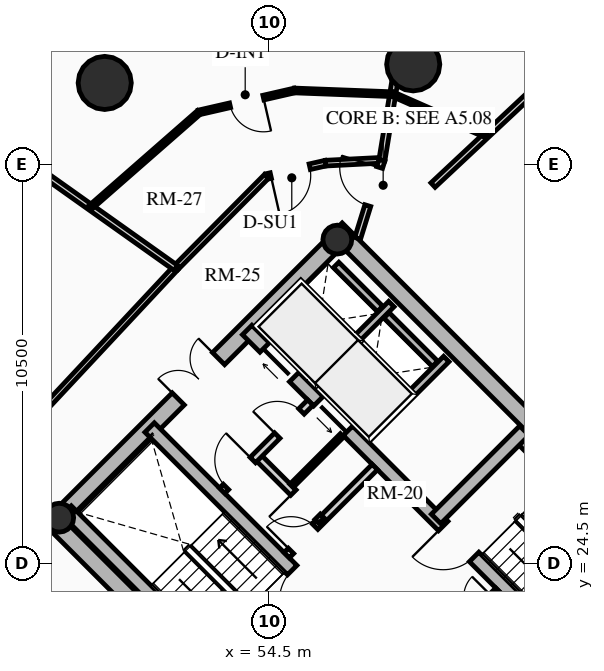
"""IFC4 building model, lengths in metres.
Left out: names, types, materials, properties, quantities, classifications, styles, units other than length and angle.
Written with IfcOpenShell. Run it as: python <this file> out.ifc"""

import sys

from ifc_helpers import new_model, si_unit, direction, frame, frame_2d, origin, origin_2d, place, context, subcontext, project, spatial, rectangle, circle, hollow_circle, extrude, source, transform, mapped, element, fill, save


model = new_model("IFC4")
c1 = context("Model", 3, precision=1e-05, world=origin(), true_north=direction((0.0, 1.0)))
c2 = subcontext(c1, "Body", "Model", "MODEL_VIEW")
j1 = project(units=[si_unit("LENGTHUNIT", "METRE"), si_unit("PLANEANGLEUNIT", "RADIAN")], contexts=[c1])
p1 = place(None, origin())
s1 = spatial("IfcSite", under=j1, at=p1, CompositionType="ELEMENT")
p2 = place(p1, origin())
s2 = spatial("IfcBuilding", under=s1, at=p2, CompositionType="ELEMENT")
p3 = place(p2, frame((0.0, 0.0, 110.89)))
s3 = spatial("IfcBuildingStorey", under=s2, at=p3, CompositionType="ELEMENT", Elevation=110.89)
for number, where, z_axis, x_axis in (
    (1, (58.737, 15.697, 0.0), (0.0, 0.0, 1.0), (-0.707, 0.707, 0.0)),
    (2, (66.303, 23.263, 0.0), (0.0, 0.0, 1.0), (-0.707, 0.707, 0.0)),
):
    element("IfcWall", number, at=place(p3, frame(where, z_axis=z_axis, x_axis=x_axis)), inside=s3, PredefinedType="SHEAR", context=c2, shape_type="SweptSolid", body=[
        extrude(rectangle(XDim=14.2, YDim=0.45, at=frame_2d((7.1, 0.0))), origin(), (0.0, 0.0, 1.0), 2.91),
    ])
p4 = place(p3, frame((48.856, 25.578, 0.0), z_axis=(0.0, 0.0, 1.0), x_axis=(0.707106781187, 0.707106781187, 0.0)))
e3 = element("IfcWall", 3, at=p4, inside=s3, PredefinedType="SHEAR", context=c2, shape_type="SweptSolid", body=[
    extrude(rectangle(XDim=10.7, YDim=0.45, at=frame_2d((5.35, 0.0))), origin(), (0.0, 0.0, 1.0), 2.91),
])
m1 = source(origin(), c2, "Body", "SweptSolid", [
    extrude(rectangle(XDim=1.5, YDim=2.02, at=frame_2d((0.75, 1.01))), frame((0.0, 0.235, 0.0), z_axis=(0.0, -1.0, 0.0), x_axis=(1.0, 0.0, 0.0)), (0.0, 0.0, 1.0), 0.47),
])
p5 = place(p4, frame((4.6, 0.0, 0.0)))
e4 = element("IfcOpeningElement", 4, at=p5, cuts=e3, PredefinedType="OPENING", context=c2, shape_type="MappedRepresentation", body=[
    mapped(m1, transform((0.0, 0.0, 0.0), x_axis=(1.0, 0.0, 0.0), y_axis=(0.0, 1.0, 0.0), z_axis=(0.0, 0.0, 1.0), scale=1.0)),
])
p6 = place(p3, frame((61.078, 18.355, 0.0), z_axis=(0.0, 0.0, 1.0), x_axis=(-0.707106781187, 0.707106781187, 0.0)))
e5 = element("IfcWall", 5, at=p6, inside=s3, PredefinedType="SHEAR", context=c2, shape_type="SweptSolid", body=[
    extrude(rectangle(XDim=13.75, YDim=0.35, at=frame_2d((6.875, 0.0))), origin(), (0.0, 0.0, 1.0), 2.91),
])
m2 = source(origin(), c2, "Body", "SweptSolid", [
    extrude(rectangle(XDim=1.1, YDim=2.015, at=frame_2d((0.55, 1.007))), frame((0.0, 0.185, 0.0), z_axis=(0.0, -1.0, 0.0), x_axis=(1.0, 0.0, 0.0)), (0.0, 0.0, 1.0), 0.37),
])
p7 = place(p6, frame((4.875, 0.0, 0.0)))
e6 = element("IfcOpeningElement", 6, at=p7, cuts=e5, PredefinedType="OPENING", context=c2, shape_type="MappedRepresentation", body=[
    mapped(m2, transform((0.0, 0.0, 0.0), x_axis=(1.0, 0.0, 0.0), y_axis=(0.0, 1.0, 0.0), z_axis=(0.0, 0.0, 1.0), scale=1.0)),
])
m3 = source(origin(), c2, "Body", "SweptSolid", [
    extrude(rectangle(XDim=1.15, YDim=2.02, at=frame_2d((0.575, 1.01))), frame((0.0, 0.185, 0.0), z_axis=(0.0, -1.0, 0.0), x_axis=(1.0, 0.0, 0.0)), (0.0, 0.0, 1.0), 0.37),
])
p8 = place(p6, frame((7.295, 0.0, 0.0)))
e7 = element("IfcOpeningElement", 7, at=p8, cuts=e5, PredefinedType="OPENING", context=c2, shape_type="MappedRepresentation", body=[
    mapped(m3, transform((0.0, 0.0, 0.0), x_axis=(1.0, 0.0, 0.0), y_axis=(0.0, 1.0, 0.0), z_axis=(0.0, 0.0, 1.0), scale=1.0)),
])
p9 = place(p3, frame((63.645, 20.922, 0.0), z_axis=(0.0, 0.0, 1.0), x_axis=(-0.707106781187, 0.707106781187, 0.0)))
e8 = element("IfcWall", 8, at=p9, inside=s3, PredefinedType="SHEAR", context=c2, shape_type="SweptSolid", body=[
    extrude(rectangle(XDim=13.75, YDim=0.35, at=frame_2d((6.875, 0.0))), origin(), (0.0, 0.0, 1.0), 2.91),
])
p10 = place(p9, frame((10.0, 0.0, 0.0)))
e9 = element("IfcOpeningElement", 9, at=p10, cuts=e8, PredefinedType="OPENING", context=c2, shape_type="MappedRepresentation", body=[
    mapped(m2, transform((0.0, 0.0, 0.0), x_axis=(1.0, 0.0, 0.0), y_axis=(0.0, 1.0, 0.0), z_axis=(0.0, 0.0, 1.0), scale=1.0)),
])
p11 = place(p9, frame((12.0, 0.0, 0.0)))
e10 = element("IfcOpeningElement", 10, at=p11, cuts=e8, PredefinedType="OPENING", context=c2, shape_type="MappedRepresentation", body=[
    mapped(m2, transform((0.0, 0.0, 0.0), x_axis=(1.0, 0.0, 0.0), y_axis=(0.0, 1.0, 0.0), z_axis=(0.0, 0.0, 1.0), scale=1.0)),
])
p12 = place(p9, frame((5.305, 0.0, 0.0)))
e11 = element("IfcOpeningElement", 11, at=p12, cuts=e8, PredefinedType="OPENING", context=c2, shape_type="MappedRepresentation", body=[
    mapped(m3, transform((0.0, 0.0, 0.0), x_axis=(1.0, 0.0, 0.0), y_axis=(0.0, 1.0, 0.0), z_axis=(0.0, 0.0, 1.0), scale=1.0)),
])
for number, where, z_axis, x_axis in (
    (12, (53.922, 21.141, 0.0), (0.0, 0.0, 1.0), (-0.707, 0.707, 0.0)),
    (13, (65.83, 23.107, 0.0), (0.0, 0.0, 1.0), (-0.707, 0.707, 0.0)),
):
    element("IfcWall", number, at=place(p3, frame(where, z_axis=z_axis, x_axis=x_axis)), inside=s3, PredefinedType="SHEAR", context=c2, shape_type="SweptSolid", body=[
        extrude(rectangle(XDim=6.72, YDim=0.35, at=frame_2d((3.36, 0.0))), origin(), (0.0, 0.0, 1.0), 2.91),
    ])
p13 = place(p3, frame((58.893, 25.674, 0.0), z_axis=(0.0, 0.0, 1.0), x_axis=(0.707106781187, 0.707106781187, 0.0)))
e14 = element("IfcWall", 14, at=p13, inside=s3, PredefinedType="SHEAR", context=c2, shape_type="SweptSolid", body=[
    extrude(rectangle(XDim=3.285, YDim=0.35, at=frame_2d((1.643, 0.0))), origin(), (0.0, 0.0, 1.0), 2.91),
])
for number, where, z_axis, x_axis in (
    (15, (48.976, 25.706, 0.0), (0.0, 0.0, 1.0), (0.707, 0.707, 0.0)),
    (16, (56.294, 33.024, 0.0), (0.0, 0.0, 1.0), (0.707, 0.707, 0.0)),
):
    element("IfcColumn", number, at=place(p3, frame(where, z_axis=z_axis, x_axis=x_axis)), inside=s3, PredefinedType="COLUMN", context=c2, shape_type="SweptSolid", body=[
        extrude(hollow_circle(Radius=0.38, WallThickness=0.032, at=origin_2d()), origin(), (0.0, 0.0, 1.0), 2.91),
    ])
for number, where, z_axis, x_axis in (
    (17, (58.291, 37.635, 0.0), (0.0, 0.0, 1.0), (1.0, 0.0, 0.0)),
    (18, (50.173, 37.146, 0.0), (0.0, 0.0, 1.0), (1.0, 0.0, 0.0)),
):
    element("IfcColumn", number, at=place(p3, frame(where, z_axis=z_axis, x_axis=x_axis)), inside=s3, PredefinedType="USERDEFINED", context=c2, shape_type="SweptSolid", body=[
        extrude(circle(Radius=0.7, at=origin_2d()), origin(), (0.0, 0.0, 1.0), 2.91),
    ])
p14 = place(p3, frame((57.062, 27.781, 0.0), z_axis=(0.0, 0.0, 1.0), x_axis=(0.707106781187, 0.707106781187, 0.0)))
e19 = element("IfcWall", 19, at=p14, inside=s3, PredefinedType="SHEAR", context=c2, shape_type="SweptSolid", body=[
    extrude(rectangle(XDim=2.97, YDim=0.2, at=frame_2d((1.485, 0.0))), origin(), (0.0, 0.0, 1.0), 2.91),
])
p15 = place(p3, frame((55.615, 29.227, 0.0), z_axis=(0.0, 0.0, 1.0), x_axis=(0.707147878904, 0.70706568108, 0.0)))
e20 = element("IfcWall", 20, at=p15, inside=s3, PredefinedType="SHEAR", context=c2, shape_type="SweptSolid", body=[
    extrude(rectangle(XDim=2.97, YDim=0.2, at=frame_2d((1.485, 0.0))), origin(), (0.0, 0.0, 1.0), 2.91),
])
p16 = place(p3, frame((58.865, 29.754, 0.0), z_axis=(0.0, 0.0, 1.0), x_axis=(-0.707174411312, 0.707039144592, 0.0)))
e21 = element("IfcWall", 21, at=p16, inside=s3, PredefinedType="SHEAR", context=c2, shape_type="SweptSolid", body=[
    extrude(rectangle(XDim=1.805, YDim=0.2, at=frame_2d((0.902, 0.0))), origin(), (0.0, 0.0, 1.0), 2.91),
])
p17 = place(p3, frame((57.419, 31.2, 0.0), z_axis=(0.0, 0.0, 1.0), x_axis=(-0.707032117043, 0.707181437447, 0.0)))
e22 = element("IfcWall", 22, at=p17, inside=s3, PredefinedType="SHEAR", context=c2, shape_type="SweptSolid", body=[
    extrude(rectangle(XDim=1.635, YDim=0.2, at=frame_2d((0.817, 0.0))), origin(), (0.0, 0.0, 1.0), 2.91),
])
p18 = place(p3, frame((58.214, 21.467, 0.0), z_axis=(0.0, 0.0, 1.0), x_axis=(0.707106781187, 0.707106781187, 0.0)))
e23 = element("IfcWall", 23, at=p18, inside=s3, PredefinedType="PARTITIONING", context=c2, shape_type="SweptSolid", body=[
    extrude(rectangle(XDim=3.28, YDim=0.2, at=frame_2d((1.64, 0.0))), origin(), (0.0, 0.0, 1.0), 2.655),
])
m4 = source(origin(), c2, "Body", "SweptSolid", [
    extrude(rectangle(XDim=1.5, YDim=2.02, at=frame_2d((0.75, 1.01))), frame((0.0, 0.11, 0.0), z_axis=(0.0, -1.0, 0.0), x_axis=(1.0, 0.0, 0.0)), (0.0, 0.0, 1.0), 0.22),
])
p19 = place(p18, frame((1.55, 0.0, 0.0)))
e24 = element("IfcOpeningElement", 24, at=p19, cuts=e23, PredefinedType="OPENING", context=c2, shape_type="MappedRepresentation", body=[
    mapped(m4, transform((0.0, 0.0, 0.0), x_axis=(1.0, 0.0, 0.0), y_axis=(0.0, 1.0, 0.0), z_axis=(0.0, 0.0, 1.0), scale=1.0)),
])
p20 = place(p3, frame((54.961, 24.719, 0.0), z_axis=(0.0, 0.0, 1.0), x_axis=(0.707106781187, 0.707106781187, 0.0)))
e25 = element("IfcWall", 25, at=p20, inside=s3, PredefinedType="PARTITIONING", context=c2, shape_type="SweptSolid", body=[
    extrude(rectangle(XDim=3.28, YDim=0.2, at=frame_2d((1.64, 0.0))), origin(), (0.0, 0.0, 1.0), 2.655),
])
m5 = source(origin(), c2, "Body", "SweptSolid", [
    extrude(rectangle(XDim=0.9, YDim=2.005, at=frame_2d((0.45, 1.002))), frame((0.0, 0.11, 0.0), z_axis=(0.0, -1.0, 0.0), x_axis=(1.0, 0.0, 0.0)), (0.0, 0.0, 1.0), 0.22),
])
p21 = place(p20, frame((0.16, 0.0, 0.0)))
e26 = element("IfcOpeningElement", 26, at=p21, cuts=e25, PredefinedType="OPENING", context=c2, shape_type="MappedRepresentation", body=[
    mapped(m5, transform((0.0, 0.0, 0.0), x_axis=(1.0, 0.0, 0.0), y_axis=(0.0, 1.0, 0.0), z_axis=(0.0, 0.0, 1.0), scale=1.0)),
])
p22 = place(p3, frame((55.874, 25.631, 0.0), z_axis=(0.0, 0.0, 1.0), x_axis=(-0.707157639372, 0.707055919343, 0.0)))
e27 = element("IfcWall", 27, at=p22, inside=s3, PredefinedType="PARTITIONING", context=c2, shape_type="SweptSolid", body=[
    extrude(rectangle(XDim=2.4, YDim=0.2, at=frame_2d((1.2, 0.0))), origin(), (0.0, 0.0, 1.0), 2.655),
])
p23 = place(p22, frame((0.14, 0.0, 0.0)))
e28 = element("IfcOpeningElement", 28, at=p23, cuts=e27, PredefinedType="OPENING", context=c2, shape_type="MappedRepresentation", body=[
    mapped(m5, transform((0.0, 0.0, 0.0), x_axis=(1.0, 0.0, 0.0), y_axis=(0.0, 1.0, 0.0), z_axis=(0.0, 0.0, 1.0), scale=1.0)),
])
p24 = place(p3, frame((53.264, 26.416, 0.0), z_axis=(0.0, 0.0, 1.0), x_axis=(0.707106781187, 0.707106781187, 0.0)))
e29 = element("IfcWall", 29, at=p24, inside=s3, PredefinedType="PARTITIONING", context=c2, shape_type="SweptSolid", body=[
    extrude(rectangle(XDim=3.28, YDim=0.2, at=frame_2d((1.64, 0.0))), origin(), (0.0, 0.0, 1.0), 2.655),
])
m6 = source(origin(), c2, "Body", "SweptSolid", [
    extrude(rectangle(XDim=1.0, YDim=2.015, at=frame_2d((0.5, 1.007))), frame((0.0, 0.11, 0.0), z_axis=(0.0, -1.0, 0.0), x_axis=(1.0, 0.0, 0.0)), (0.0, 0.0, 1.0), 0.22),
])
p25 = place(p24, frame((0.14, 0.0, 0.0)))
e30 = element("IfcOpeningElement", 30, at=p25, cuts=e29, PredefinedType="OPENING", context=c2, shape_type="MappedRepresentation", body=[
    mapped(m6, transform((0.0, 0.0, 0.0), x_axis=(1.0, 0.0, 0.0), y_axis=(0.0, 1.0, 0.0), z_axis=(0.0, 0.0, 1.0), scale=1.0)),
])
p26 = place(p24, frame((2.05, 0.0, 0.0)))
e31 = element("IfcOpeningElement", 31, at=p26, cuts=e29, PredefinedType="OPENING", context=c2, shape_type="MappedRepresentation", body=[
    mapped(m5, transform((0.0, 0.0, 0.0), x_axis=(1.0, 0.0, 0.0), y_axis=(0.0, 1.0, 0.0), z_axis=(0.0, 0.0, 1.0), scale=1.0)),
])
p27 = place(p3, frame((55.089, 26.543, 0.0), z_axis=(0.0, 0.0, 1.0), x_axis=(0.707106781187, 0.707106781187, 0.0)))
e32 = element("IfcWall", 32, at=p27, inside=s3, PredefinedType="PARTITIONING", context=c2, shape_type="SweptSolid", body=[
    extrude(rectangle(XDim=1.88, YDim=0.125, at=frame_2d((0.94, 0.0))), origin(), (0.0, 0.0, 1.0), 2.655),
])
p28 = place(p3, frame((57.467, 35.111, 0.0), z_axis=(0.0, 0.0, 1.0), x_axis=(-0.998691757323, -0.051134859488, 0.0)))
e33 = element("IfcWall", 33, at=p28, inside=s3, PredefinedType="PARTITIONING", context=c2, shape_type="SweptSolid", body=[
    extrude(rectangle(XDim=1.485, YDim=0.15, at=frame_2d((0.742, 0.0))), origin(), (0.0, 0.0, 1.0), 2.225),
])
p29 = place(p3, frame((55.984, 35.035, 0.0), z_axis=(0.0, 0.0, 1.0), x_axis=(-0.975290305708, -0.22092718165, 0.0)))
e34 = element("IfcWall", 34, at=p29, inside=s3, PredefinedType="PARTITIONING", context=c2, shape_type="SweptSolid", body=[
    extrude(rectangle(XDim=1.597, YDim=0.15, at=frame_2d((0.798, 0.0))), origin(), (0.0, 0.0, 1.0), 2.225),
])
m7 = source(origin(), c2, "Body", "SweptSolid", [
    extrude(rectangle(XDim=1.05, YDim=2.015, at=frame_2d((0.525, 1.007))), frame((0.0, 0.085, 0.0), z_axis=(0.0, -1.0, 0.0), x_axis=(1.0, 0.0, 0.0)), (0.0, 0.0, 1.0), 0.17),
])
p30 = place(p29, frame((0.427, 0.0, 0.0)))
e35 = element("IfcOpeningElement", 35, at=p30, cuts=e34, PredefinedType="OPENING", context=c2, shape_type="MappedRepresentation", body=[
    mapped(m7, transform((0.0, 0.0, 0.0), x_axis=(1.0, 0.0, 0.0), y_axis=(0.0, 1.0, 0.0), z_axis=(0.0, 0.0, 1.0), scale=1.0)),
])
p31 = place(p3, frame((54.427, 34.683, 0.0), z_axis=(0.0, 0.0, 1.0), x_axis=(-0.704178989986, -0.710022499687, 0.0)))
e36 = element("IfcWall", 36, at=p31, inside=s3, PredefinedType="PARTITIONING", context=c2, shape_type="SweptSolid", body=[
    extrude(rectangle(XDim=3.384, YDim=0.15, at=frame_2d((1.692, 0.0))), origin(), (0.0, 0.0, 1.0), 2.225),
])
p32 = place(p3, frame((52.043, 32.28, 0.0), z_axis=(0.0, 0.0, 1.0), x_axis=(-0.682606081633, -0.730786519661, 0.0)))
e37 = element("IfcWall", 37, at=p32, inside=s3, PredefinedType="PARTITIONING", context=c2, shape_type="SweptSolid", body=[
    extrude(rectangle(XDim=6.527, YDim=0.15, at=frame_2d((3.263, 0.0))), origin(), (0.0, 0.0, 1.0), 2.225),
])
p33 = place(p3, frame((58.812, 34.458, 0.0), z_axis=(0.0, 0.0, 1.0), x_axis=(0.73022196979, 0.683209978584, 0.0)))
e38 = element("IfcWall", 38, at=p33, inside=s3, PredefinedType="PARTITIONING", context=c2, shape_type="SweptSolid", body=[
    extrude(rectangle(XDim=6.834, YDim=0.16, at=frame_2d((3.417, 0.0))), origin(), (0.0, 0.0, 1.0), 2.179),
])
p34 = place(p3, frame((57.467, 35.111, 0.0), z_axis=(0.0, 0.0, 1.0), x_axis=(0.161711214096, 0.98683812413, 0.0)))
e39 = element("IfcWall", 39, at=p34, inside=s3, PredefinedType="PARTITIONING", context=c2, shape_type="SweptSolid", body=[
    extrude(rectangle(XDim=6.291, YDim=0.16, at=frame_2d((3.146, 0.0))), origin(), (0.0, 0.0, 1.0), 2.179),
])
p35 = place(p3, frame((52.043, 32.28, 0.0), z_axis=(0.0, 0.0, 1.0), x_axis=(-0.81534487613, 0.578975589268, 0.0)))
e40 = element("IfcWall", 40, at=p35, inside=s3, PredefinedType="PARTITIONING", context=c2, shape_type="SweptSolid", body=[
    extrude(rectangle(XDim=9.829, YDim=0.16, at=frame_2d((4.915, 0.0))), origin(), (0.0, 0.0, 1.0), 2.179),
])
p36 = place(p3, frame((56.828, 33.056, 0.0), z_axis=(0.0, 0.0, 1.0), x_axis=(0.296730996083, 0.954961107042, 0.0)))
e41 = element("IfcWall", 41, at=p36, inside=s3, PredefinedType="PARTITIONING", context=c2, shape_type="SweptSolid", body=[
    extrude(rectangle(XDim=2.152, YDim=0.16, at=frame_2d((1.076, 0.0))), origin(), (0.0, 0.0, 1.0), 2.225),
])
m8 = source(origin(), c2, "Body", "SweptSolid", [
    extrude(rectangle(XDim=1.05, YDim=2.015, at=frame_2d((0.525, 1.007))), frame((0.0, 0.09, 0.0), z_axis=(0.0, -1.0, 0.0), x_axis=(1.0, 0.0, 0.0)), (0.0, 0.0, 1.0), 0.18),
])
p37 = place(p36, frame((0.902, 0.0, 0.0)))
e42 = element("IfcOpeningElement", 42, at=p37, cuts=e41, PredefinedType="OPENING", context=c2, shape_type="MappedRepresentation", body=[
    mapped(m8, transform((0.0, 0.0, 0.0), x_axis=(1.0, 0.0, 0.0), y_axis=(0.0, 1.0, 0.0), z_axis=(0.0, 0.0, 1.0), scale=1.0)),
])
p38 = place(p3, frame((60.209, 35.766, 0.0), z_axis=(0.0, 0.0, 1.0), x_axis=(-0.914932611268, 0.403606636267, 0.0)))
e43 = element("IfcWall", 43, at=p38, inside=s3, PredefinedType="PARTITIONING", context=c2, shape_type="SweptSolid", body=[
    extrude(rectangle(XDim=2.686, YDim=0.125, at=frame_2d((1.343, 0.0))), origin(), (0.0, 0.0, 1.0), 2.225),
])
p39 = place(p3, frame((57.752, 36.85, 0.0), z_axis=(0.0, 0.0, 1.0), x_axis=(-0.999279468675, 0.037954492291, 0.0)))
e44 = element("IfcWall", 44, at=p39, inside=s3, PredefinedType="PARTITIONING", context=c2, shape_type="SweptSolid", body=[
    extrude(rectangle(XDim=2.586, YDim=0.125, at=frame_2d((1.293, 0.0))), origin(), (0.0, 0.0, 1.0), 2.655),
])
p40 = place(p3, frame((55.168, 36.948, 0.0), z_axis=(0.0, 0.0, 1.0), x_axis=(-0.974677367116, -0.223615808993, 0.0)))
e45 = element("IfcWall", 45, at=p40, inside=s3, PredefinedType="PARTITIONING", context=c2, shape_type="SweptSolid", body=[
    extrude(rectangle(XDim=2.581, YDim=0.125, at=frame_2d((1.291, 0.0))), origin(), (0.0, 0.0, 1.0), 2.225),
])
m9 = source(origin(), c2, "Body", "SweptSolid", [
    extrude(rectangle(XDim=0.9, YDim=2.005, at=frame_2d((0.45, 1.002))), frame((0.0, 0.073, 0.0), z_axis=(0.0, -1.0, 0.0), x_axis=(1.0, 0.0, 0.0)), (0.0, 0.0, 1.0), 0.145),
])
p41 = place(p40, frame((0.841, 0.0, 0.0)))
e46 = element("IfcOpeningElement", 46, at=p41, cuts=e45, PredefinedType="OPENING", context=c2, shape_type="MappedRepresentation", body=[
    mapped(m9, transform((0.0, 0.0, 0.0), x_axis=(1.0, 0.0, 0.0), y_axis=(0.0, 1.0, 0.0), z_axis=(0.0, 0.0, 1.0), scale=1.0)),
])
p42 = place(p3, frame((52.652, 36.371, 0.0), z_axis=(0.0, 0.0, 1.0), x_axis=(-0.752401146533, -0.658705180408, 0.0)))
e47 = element("IfcWall", 47, at=p42, inside=s3, PredefinedType="PARTITIONING", context=c2, shape_type="SweptSolid", body=[
    extrude(rectangle(XDim=3.791, YDim=0.125, at=frame_2d((1.896, 0.0))), origin(), (0.0, 0.0, 1.0), 2.225),
])
m10 = source(origin(), c2, "Body", "SweptSolid", [
    extrude(rectangle(XDim=1.1, YDim=2.015, at=frame_2d((0.55, 1.007))), frame((0.0, 0.025, 0.0), z_axis=(0.0, -1.0, 0.0), x_axis=(1.0, 0.0, 0.0)), (0.0, 0.0, 1.0), 0.05),
])
p43 = place(p10, origin())
e48 = element("IfcDoor", 48, at=p43, inside=s3, OperationType="SLIDING_TO_LEFT", PredefinedType="DOOR", context=c2, shape_type="MappedRepresentation", body=[
    mapped(m10, transform((0.0, 0.0, 0.0), x_axis=(1.0, 0.0, 0.0), y_axis=(0.0, 1.0, 0.0), z_axis=(0.0, 0.0, 1.0), scale=1.0)),
])
fill(e9, e48)
p44 = place(p11, origin())
e49 = element("IfcDoor", 49, at=p44, inside=s3, OperationType="SLIDING_TO_RIGHT", PredefinedType="DOOR", context=c2, shape_type="MappedRepresentation", body=[
    mapped(m10, transform((0.0, 0.0, 0.0), x_axis=(1.0, 0.0, 0.0), y_axis=(0.0, 1.0, 0.0), z_axis=(0.0, 0.0, 1.0), scale=1.0)),
])
fill(e10, e49)
m11 = source(origin(), c2, "Body", "SweptSolid", [
    extrude(rectangle(XDim=1.15, YDim=2.02, at=frame_2d((0.575, 1.01))), frame((0.0, 0.025, 0.0), z_axis=(0.0, -1.0, 0.0), x_axis=(1.0, 0.0, 0.0)), (0.0, 0.0, 1.0), 0.05),
])
p45 = place(p8, origin())
e50 = element("IfcDoor", 50, at=p45, inside=s3, OperationType="SINGLE_SWING_LEFT", PredefinedType="DOOR", context=c2, shape_type="MappedRepresentation", body=[
    mapped(m11, transform((0.0, 0.0, 0.0), x_axis=(1.0, 0.0, 0.0), y_axis=(0.0, 1.0, 0.0), z_axis=(0.0, 0.0, 1.0), scale=1.0)),
])
fill(e7, e50)
p46 = place(p12, origin())
e51 = element("IfcDoor", 51, at=p46, inside=s3, OperationType="SINGLE_SWING_RIGHT", PredefinedType="DOOR", context=c2, shape_type="MappedRepresentation", body=[
    mapped(m11, transform((0.0, 0.0, 0.0), x_axis=(1.0, 0.0, 0.0), y_axis=(0.0, 1.0, 0.0), z_axis=(0.0, 0.0, 1.0), scale=1.0)),
])
fill(e11, e51)
m12 = source(origin(), c2, "Body", "SweptSolid", [
    extrude(rectangle(XDim=1.5, YDim=2.02, at=frame_2d((0.75, 1.01))), frame((0.0, 0.025, 0.0), z_axis=(0.0, -1.0, 0.0), x_axis=(1.0, 0.0, 0.0)), (0.0, 0.0, 1.0), 0.05),
])
p47 = place(p5, origin())
e52 = element("IfcDoor", 52, at=p47, inside=s3, OperationType="DOUBLE_DOOR_SINGLE_SWING", PredefinedType="DOOR", context=c2, shape_type="MappedRepresentation", body=[
    mapped(m12, transform((0.0, 0.0, 0.0), x_axis=(1.0, 0.0, 0.0), y_axis=(0.0, 1.0, 0.0), z_axis=(0.0, 0.0, 1.0), scale=1.0)),
])
fill(e4, e52)
m13 = source(origin(), c2, "Body", "SweptSolid", [
    extrude(rectangle(XDim=0.9, YDim=2.005, at=frame_2d((0.45, 1.002))), frame((0.0, 0.025, 0.0), z_axis=(0.0, -1.0, 0.0), x_axis=(1.0, 0.0, 0.0)), (0.0, 0.0, 1.0), 0.05),
])
p48 = place(p21, origin())
e53 = element("IfcDoor", 53, at=p48, inside=s3, OperationType="SINGLE_SWING_LEFT", PredefinedType="DOOR", context=c2, shape_type="MappedRepresentation", body=[
    mapped(m13, transform((0.0, 0.0, 0.0), x_axis=(1.0, 0.0, 0.0), y_axis=(0.0, 1.0, 0.0), z_axis=(0.0, 0.0, 1.0), scale=1.0)),
])
fill(e26, e53)
m14 = source(origin(), c2, "Body", "SweptSolid", [
    extrude(rectangle(XDim=1.0, YDim=2.015, at=frame_2d((0.5, 1.007))), frame((0.0, 0.025, 0.0), z_axis=(0.0, -1.0, 0.0), x_axis=(1.0, 0.0, 0.0)), (0.0, 0.0, 1.0), 0.05),
])
p49 = place(p25, origin())
e54 = element("IfcDoor", 54, at=p49, inside=s3, OperationType="SINGLE_SWING_RIGHT", PredefinedType="DOOR", context=c2, shape_type="MappedRepresentation", body=[
    mapped(m14, transform((0.0, 0.0, 0.0), x_axis=(1.0, 0.0, 0.0), y_axis=(0.0, 1.0, 0.0), z_axis=(0.0, 0.0, 1.0), scale=1.0)),
])
fill(e30, e54)
p50 = place(p23, origin())
e55 = element("IfcDoor", 55, at=p50, inside=s3, OperationType="SINGLE_SWING_RIGHT", PredefinedType="DOOR", context=c2, shape_type="MappedRepresentation", body=[
    mapped(m13, transform((0.0, 0.0, 0.0), x_axis=(1.0, 0.0, 0.0), y_axis=(0.0, 1.0, 0.0), z_axis=(0.0, 0.0, 1.0), scale=1.0)),
])
fill(e28, e55)
p51 = place(p26, origin())
e56 = element("IfcDoor", 56, at=p51, inside=s3, OperationType="SINGLE_SWING_LEFT", PredefinedType="DOOR", context=c2, shape_type="MappedRepresentation", body=[
    mapped(m13, transform((0.0, 0.0, 0.0), x_axis=(1.0, 0.0, 0.0), y_axis=(0.0, 1.0, 0.0), z_axis=(0.0, 0.0, 1.0), scale=1.0)),
])
fill(e31, e56)
m15 = source(origin(), c2, "Body", "SweptSolid", [
    extrude(rectangle(XDim=1.05, YDim=2.015, at=frame_2d((0.525, 1.007))), frame((0.0, 0.025, 0.0), z_axis=(0.0, -1.0, 0.0), x_axis=(1.0, 0.0, 0.0)), (0.0, 0.0, 1.0), 0.05),
])
p52 = place(p37, origin())
e57 = element("IfcDoor", 57, at=p52, inside=s3, OperationType="SINGLE_SWING_RIGHT", PredefinedType="DOOR", context=c2, shape_type="MappedRepresentation", body=[
    mapped(m15, transform((0.0, 0.0, 0.0), x_axis=(1.0, 0.0, 0.0), y_axis=(0.0, 1.0, 0.0), z_axis=(0.0, 0.0, 1.0), scale=1.0)),
])
fill(e42, e57)
p53 = place(p30, origin())
e58 = element("IfcDoor", 58, at=p53, inside=s3, OperationType="SINGLE_SWING_RIGHT", PredefinedType="DOOR", context=c2, shape_type="MappedRepresentation", body=[
    mapped(m15, transform((0.0, 0.0, 0.0), x_axis=(1.0, 0.0, 0.0), y_axis=(0.0, 1.0, 0.0), z_axis=(0.0, 0.0, 1.0), scale=1.0)),
])
fill(e35, e58)
p54 = place(p41, origin())
e59 = element("IfcDoor", 59, at=p54, inside=s3, OperationType="SINGLE_SWING_LEFT", PredefinedType="DOOR", context=c2, shape_type="MappedRepresentation", body=[
    mapped(m13, transform((0.0, 0.0, 0.0), x_axis=(1.0, 0.0, 0.0), y_axis=(0.0, 1.0, 0.0), z_axis=(0.0, 0.0, 1.0), scale=1.0)),
])
fill(e46, e59)
save(model, sys.argv[1])
